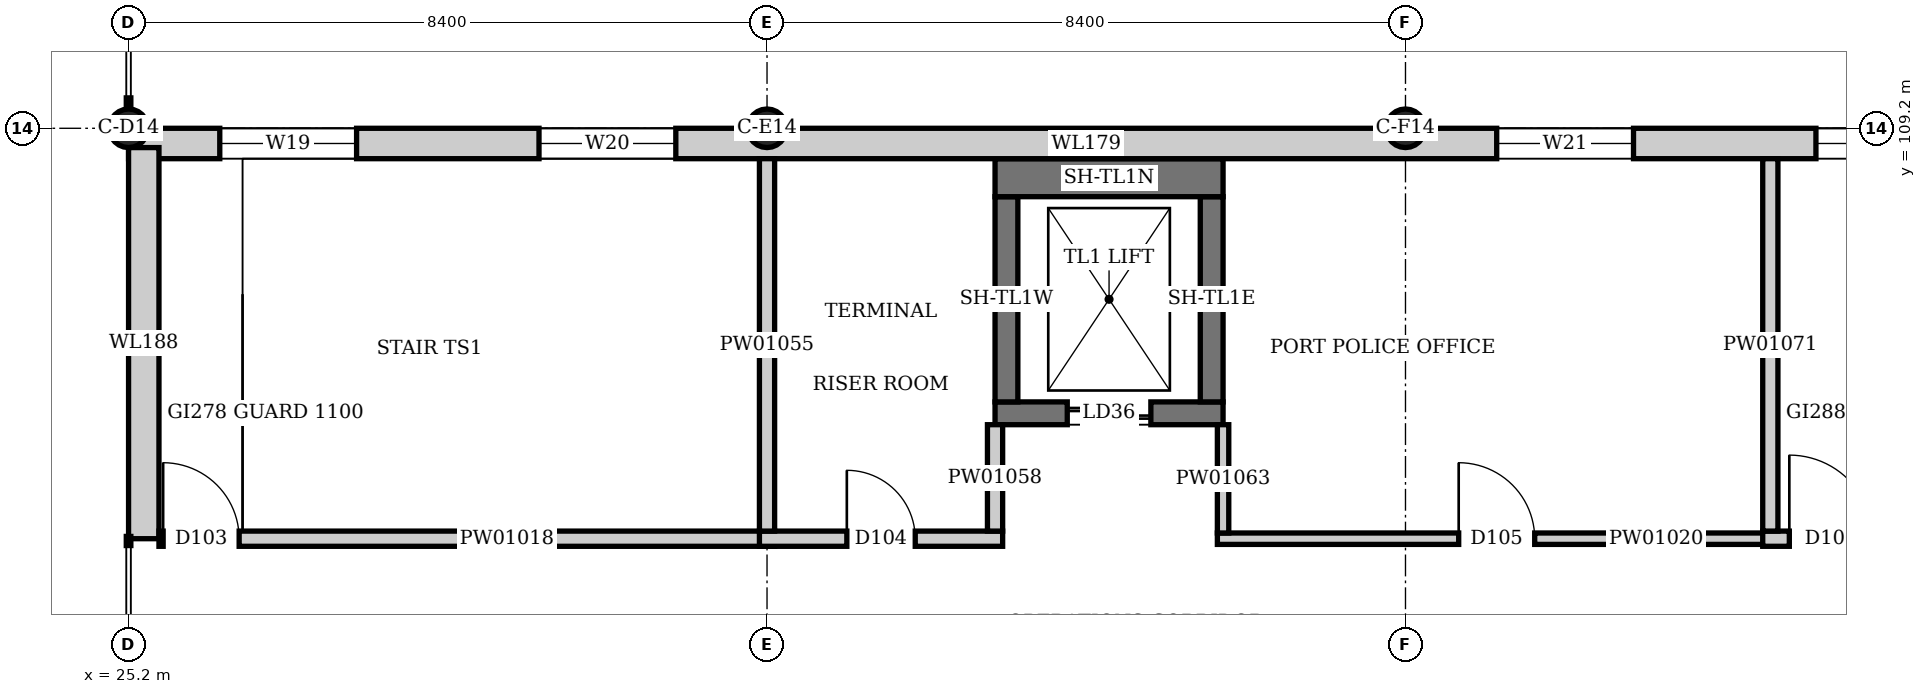
"""IFC4 building model, lengths in metres.
Left out: names, types, materials, properties, quantities, classifications, styles, units other than length and angle.
Written with IfcOpenShell. Run it as: python <this file> out.ifc"""

import sys

from ifc_helpers import new_model, si_unit, direction, frame, frame_2d, origin, origin_2d, place, context, subcontext, project, spatial, rectangle, hollow_circle, extrude, element, fill, save


model = new_model("IFC4")
c1 = context("Model", 3, precision=1e-05, world=origin(), true_north=direction((0.0, 1.0)))
c2 = subcontext(c1, "Body", "Model", "MODEL_VIEW")
j1 = project(units=[si_unit("LENGTHUNIT", "METRE"), si_unit("PLANEANGLEUNIT", "RADIAN")], contexts=[c1])
p1 = place(None, origin())
s1 = spatial("IfcSite", under=j1, at=p1, CompositionType="ELEMENT")
p2 = place(p1, origin())
s2 = spatial("IfcBuilding", under=s1, at=p2, CompositionType="ELEMENT")
p3 = place(p2, frame((0.0, 0.0, 6.0)))
s3 = spatial("IfcBuildingStorey", under=s2, at=p3, CompositionType="ELEMENT", Elevation=6.0)
for number, where, z_axis, x_axis in (
    (1, (25.2, 109.2, 0.0), (0.0, 0.0, 1.0), (1.0, 0.0, 0.0)),
    (2, (33.6, 109.2, 0.0), (0.0, 0.0, 1.0), (1.0, 0.0, 0.0)),
    (3, (42.0, 109.2, 0.0), (0.0, 0.0, 1.0), (1.0, 0.0, 0.0)),
):
    element("IfcColumn", number, at=place(p3, frame(where, z_axis=z_axis, x_axis=x_axis)), inside=s3, PredefinedType="COLUMN", context=c2, shape_type="SweptSolid", body=[
        extrude(hollow_circle(Radius=0.254, WallThickness=0.016, at=origin_2d()), origin(), (0.0, 0.0, 1.0), 4.8),
    ])
p4 = place(p3, frame((36.6, 105.45, 0.0), z_axis=(0.0, 0.0, 1.0), x_axis=(1.0, 0.0, 0.0)))
e4 = element("IfcWall", 4, at=p4, inside=s3, PredefinedType="SHEAR", context=c2, shape_type="SweptSolid", body=[
    extrude(rectangle(XDim=3.0, YDim=0.3, at=frame_2d((1.5, 0.0))), origin(), (0.0, 0.0, 1.0), 4.65),
])
p5 = place(p4, frame((0.95, 0.0, 0.0)))
e5 = element("IfcOpeningElement", 5, at=p5, cuts=e4, PredefinedType="OPENING", context=c2, shape_type="SweptSolid", body=[
    extrude(rectangle(XDim=1.1, YDim=2.1, at=frame_2d((0.55, 1.05))), frame((0.0, 0.16, 0.0), z_axis=(0.0, -1.0, 0.0), x_axis=(1.0, 0.0, 0.0)), (0.0, 0.0, 1.0), 0.32),
])
for number, where, z_axis, x_axis in (
    (6, (39.45, 105.6, 0.0), (0.0, 0.0, 1.0), (0.0, 1.0, 0.0)),
    (7, (36.75, 105.6, 0.0), (0.0, 0.0, 1.0), (0.0, 1.0, 0.0)),
):
    element("IfcWall", number, at=place(p3, frame(where, z_axis=z_axis, x_axis=x_axis)), inside=s3, PredefinedType="SHEAR", context=c2, shape_type="SweptSolid", body=[
        extrude(rectangle(XDim=2.7, YDim=0.3, at=frame_2d((1.35, 0.0))), origin(), (0.0, 0.0, 1.0), 4.65),
    ])
p6 = place(p3, frame((36.6, 108.55, 0.0), z_axis=(0.0, 0.0, 1.0), x_axis=(1.0, 0.0, 0.0)))
e8 = element("IfcWall", 8, at=p6, inside=s3, PredefinedType="SHEAR", context=c2, shape_type="SweptSolid", body=[
    extrude(rectangle(XDim=3.0, YDim=0.5, at=frame_2d((1.5, 0.0))), origin(), (0.0, 0.0, 1.0), 4.65),
])
p7 = place(p3, frame((25.2, 109.0, 0.0), z_axis=(0.0, 0.0, 1.0), x_axis=(1.0, 0.0, 0.0)))
e9 = element("IfcWall", 9, at=p7, inside=s3, PredefinedType="SOLIDWALL", context=c2, shape_type="SweptSolid", body=[
    extrude(rectangle(XDim=67.2, YDim=0.4, at=frame_2d((33.6, 0.0))), origin(), (0.0, 0.0, 1.0), 4.6),
])
p8 = place(p7, frame((1.2, 0.0, 0.9)))
e10 = element("IfcOpeningElement", 10, at=p8, cuts=e9, PredefinedType="OPENING", context=c2, shape_type="SweptSolid", body=[
    extrude(rectangle(XDim=1.8, YDim=1.8, at=frame_2d((0.9, 0.9))), frame((0.0, 0.21, 0.0), z_axis=(0.0, -1.0, 0.0), x_axis=(1.0, 0.0, 0.0)), (0.0, 0.0, 1.0), 0.42),
])
p9 = place(p7, frame((5.4, 0.0, 0.9)))
e11 = element("IfcOpeningElement", 11, at=p9, cuts=e9, PredefinedType="OPENING", context=c2, shape_type="SweptSolid", body=[
    extrude(rectangle(XDim=1.8, YDim=1.8, at=frame_2d((0.9, 0.9))), frame((0.0, 0.21, 0.0), z_axis=(0.0, -1.0, 0.0), x_axis=(1.0, 0.0, 0.0)), (0.0, 0.0, 1.0), 0.42),
])
p10 = place(p7, frame((18.0, 0.0, 0.9)))
e12 = element("IfcOpeningElement", 12, at=p10, cuts=e9, PredefinedType="OPENING", context=c2, shape_type="SweptSolid", body=[
    extrude(rectangle(XDim=1.8, YDim=1.8, at=frame_2d((0.9, 0.9))), frame((0.0, 0.21, 0.0), z_axis=(0.0, -1.0, 0.0), x_axis=(1.0, 0.0, 0.0)), (0.0, 0.0, 1.0), 0.42),
])
p11 = place(p7, frame((22.2, 0.0, 0.9)))
e13 = element("IfcOpeningElement", 13, at=p11, cuts=e9, PredefinedType="OPENING", context=c2, shape_type="SweptSolid", body=[
    extrude(rectangle(XDim=1.8, YDim=1.8, at=frame_2d((0.9, 0.9))), frame((0.0, 0.21, 0.0), z_axis=(0.0, -1.0, 0.0), x_axis=(1.0, 0.0, 0.0)), (0.0, 0.0, 1.0), 0.42),
])
p12 = place(p7, frame((26.4, 0.0, 0.9)))
e14 = element("IfcOpeningElement", 14, at=p12, cuts=e9, PredefinedType="OPENING", context=c2, shape_type="SweptSolid", body=[
    extrude(rectangle(XDim=1.8, YDim=1.8, at=frame_2d((0.9, 0.9))), frame((0.0, 0.21, 0.0), z_axis=(0.0, -1.0, 0.0), x_axis=(1.0, 0.0, 0.0)), (0.0, 0.0, 1.0), 0.42),
])
p13 = place(p7, frame((30.6, 0.0, 0.9)))
e15 = element("IfcOpeningElement", 15, at=p13, cuts=e9, PredefinedType="OPENING", context=c2, shape_type="SweptSolid", body=[
    extrude(rectangle(XDim=1.8, YDim=1.8, at=frame_2d((0.9, 0.9))), frame((0.0, 0.21, 0.0), z_axis=(0.0, -1.0, 0.0), x_axis=(1.0, 0.0, 0.0)), (0.0, 0.0, 1.0), 0.42),
])
p14 = place(p7, frame((34.8, 0.0, 0.9)))
e16 = element("IfcOpeningElement", 16, at=p14, cuts=e9, PredefinedType="OPENING", context=c2, shape_type="SweptSolid", body=[
    extrude(rectangle(XDim=1.8, YDim=1.8, at=frame_2d((0.9, 0.9))), frame((0.0, 0.21, 0.0), z_axis=(0.0, -1.0, 0.0), x_axis=(1.0, 0.0, 0.0)), (0.0, 0.0, 1.0), 0.42),
])
p15 = place(p7, frame((43.2, 0.0, 0.9)))
e17 = element("IfcOpeningElement", 17, at=p15, cuts=e9, PredefinedType="OPENING", context=c2, shape_type="SweptSolid", body=[
    extrude(rectangle(XDim=1.8, YDim=1.8, at=frame_2d((0.9, 0.9))), frame((0.0, 0.21, 0.0), z_axis=(0.0, -1.0, 0.0), x_axis=(1.0, 0.0, 0.0)), (0.0, 0.0, 1.0), 0.42),
])
p16 = place(p7, frame((47.4, 0.0, 0.9)))
e18 = element("IfcOpeningElement", 18, at=p16, cuts=e9, PredefinedType="OPENING", context=c2, shape_type="SweptSolid", body=[
    extrude(rectangle(XDim=1.8, YDim=1.8, at=frame_2d((0.9, 0.9))), frame((0.0, 0.21, 0.0), z_axis=(0.0, -1.0, 0.0), x_axis=(1.0, 0.0, 0.0)), (0.0, 0.0, 1.0), 0.42),
])
p17 = place(p7, frame((55.8, 0.0, 0.9)))
e19 = element("IfcOpeningElement", 19, at=p17, cuts=e9, PredefinedType="OPENING", context=c2, shape_type="SweptSolid", body=[
    extrude(rectangle(XDim=1.8, YDim=1.8, at=frame_2d((0.9, 0.9))), frame((0.0, 0.21, 0.0), z_axis=(0.0, -1.0, 0.0), x_axis=(1.0, 0.0, 0.0)), (0.0, 0.0, 1.0), 0.42),
])
p18 = place(p7, frame((64.2, 0.0, 0.9)))
e20 = element("IfcOpeningElement", 20, at=p18, cuts=e9, PredefinedType="OPENING", context=c2, shape_type="SweptSolid", body=[
    extrude(rectangle(XDim=1.8, YDim=1.8, at=frame_2d((0.9, 0.9))), frame((0.0, 0.21, 0.0), z_axis=(0.0, -1.0, 0.0), x_axis=(1.0, 0.0, 0.0)), (0.0, 0.0, 1.0), 0.42),
])
p19 = place(p3, frame((25.4, 103.8, 0.0), z_axis=(0.0, 0.0, 1.0), x_axis=(0.0, 1.0, 0.0)))
e21 = element("IfcWall", 21, at=p19, inside=s3, PredefinedType="SOLIDWALL", context=c2, shape_type="SweptSolid", body=[
    extrude(rectangle(XDim=5.146, YDim=0.4, at=frame_2d((2.573, 0.0))), origin(), (0.0, 0.0, 1.0), 4.6),
])
p20 = place(p3, frame((25.6, 103.8, 0.0), z_axis=(0.0, 0.0, 1.0), x_axis=(1.0, 0.0, 0.0)))
e22 = element("IfcWall", 22, at=p20, inside=s3, PredefinedType="PARTITIONING", context=c2, shape_type="SweptSolid", body=[
    extrude(rectangle(XDim=8.1, YDim=0.2, at=frame_2d((4.05, 0.0))), origin(), (0.0, 0.0, 1.0), 4.6),
])
p21 = place(p20, frame((0.055, 0.0, 0.0)))
e23 = element("IfcOpeningElement", 23, at=p21, cuts=e22, PredefinedType="OPENING", context=c2, shape_type="SweptSolid", body=[
    extrude(rectangle(XDim=1.0, YDim=2.4, at=frame_2d((0.5, 1.2))), frame((0.0, 0.11, 0.0), z_axis=(0.0, -1.0, 0.0), x_axis=(1.0, 0.0, 0.0)), (0.0, 0.0, 1.0), 0.22),
])
p22 = place(p3, frame((33.5, 103.8, 0.0), z_axis=(0.0, 0.0, 1.0), x_axis=(1.0, 0.0, 0.0)))
e24 = element("IfcWall", 24, at=p22, inside=s3, PredefinedType="PARTITIONING", context=c2, shape_type="SweptSolid", body=[
    extrude(rectangle(XDim=3.2, YDim=0.2, at=frame_2d((1.6, 0.0))), origin(), (0.0, 0.0, 1.0), 4.6),
])
p23 = place(p22, frame((1.15, 0.0, 0.0)))
e25 = element("IfcOpeningElement", 25, at=p23, cuts=e24, PredefinedType="OPENING", context=c2, shape_type="SweptSolid", body=[
    extrude(rectangle(XDim=0.9, YDim=2.1, at=frame_2d((0.45, 1.05))), frame((0.0, 0.11, 0.0), z_axis=(0.0, -1.0, 0.0), x_axis=(1.0, 0.0, 0.0)), (0.0, 0.0, 1.0), 0.22),
])
p24 = place(p3, frame((39.525, 103.8, 0.0), z_axis=(0.0, 0.0, 1.0), x_axis=(1.0, 0.0, 0.0)))
e26 = element("IfcWall", 26, at=p24, inside=s3, PredefinedType="PARTITIONING", context=c2, shape_type="SweptSolid", body=[
    extrude(rectangle(XDim=7.375, YDim=0.15, at=frame_2d((3.688, 0.0))), origin(), (0.0, 0.0, 1.0), 4.6),
])
p25 = place(p24, frame((3.175, 0.0, 0.0)))
e27 = element("IfcOpeningElement", 27, at=p25, cuts=e26, PredefinedType="OPENING", context=c2, shape_type="SweptSolid", body=[
    extrude(rectangle(XDim=1.0, YDim=2.1, at=frame_2d((0.5, 1.05))), frame((0.0, 0.085, 0.0), z_axis=(0.0, -1.0, 0.0), x_axis=(1.0, 0.0, 0.0)), (0.0, 0.0, 1.0), 0.17),
])
p26 = place(p3, frame((46.7, 103.8, 0.0), z_axis=(0.0, 0.0, 1.0), x_axis=(1.0, 0.0, 0.0)))
e28 = element("IfcWall", 28, at=p26, inside=s3, PredefinedType="PARTITIONING", context=c2, shape_type="SweptSolid", body=[
    extrude(rectangle(XDim=15.8, YDim=0.2, at=frame_2d((7.9, 0.0))), origin(), (0.0, 0.0, 1.0), 4.6),
])
p27 = place(p26, frame((0.35, 0.0, 0.0)))
e29 = element("IfcOpeningElement", 29, at=p27, cuts=e28, PredefinedType="OPENING", context=c2, shape_type="SweptSolid", body=[
    extrude(rectangle(XDim=1.1, YDim=2.4, at=frame_2d((0.55, 1.2))), frame((0.0, 0.11, 0.0), z_axis=(0.0, -1.0, 0.0), x_axis=(1.0, 0.0, 0.0)), (0.0, 0.0, 1.0), 0.22),
])
p28 = place(p26, frame((8.15, 0.0, 0.0)))
e30 = element("IfcOpeningElement", 30, at=p28, cuts=e28, PredefinedType="OPENING", context=c2, shape_type="SweptSolid", body=[
    extrude(rectangle(XDim=1.1, YDim=2.4, at=frame_2d((0.55, 1.2))), frame((0.0, 0.11, 0.0), z_axis=(0.0, -1.0, 0.0), x_axis=(1.0, 0.0, 0.0)), (0.0, 0.0, 1.0), 0.22),
])
p29 = place(p3, frame((33.6, 103.9, 0.0), z_axis=(0.0, 0.0, 1.0), x_axis=(0.0, 1.0, 0.0)))
e31 = element("IfcWall", 31, at=p29, inside=s3, PredefinedType="PARTITIONING", context=c2, shape_type="SweptSolid", body=[
    extrude(rectangle(XDim=4.9, YDim=0.2, at=frame_2d((2.45, 0.0))), origin(), (0.0, 0.0, 1.0), 4.146),
])
p30 = place(p3, frame((36.6, 103.9, 0.0), z_axis=(0.0, 0.0, 1.0), x_axis=(0.0, 1.0, 0.0)))
e32 = element("IfcWall", 32, at=p30, inside=s3, PredefinedType="PARTITIONING", context=c2, shape_type="SweptSolid", body=[
    extrude(rectangle(XDim=1.4, YDim=0.2, at=frame_2d((0.7, 0.0))), origin(), (0.0, 0.0, 1.0), 4.6),
])
p31 = place(p3, frame((39.6, 103.875, 0.0), z_axis=(0.0, 0.0, 1.0), x_axis=(0.0, 1.0, 0.0)))
e33 = element("IfcWall", 33, at=p31, inside=s3, PredefinedType="PARTITIONING", context=c2, shape_type="SweptSolid", body=[
    extrude(rectangle(XDim=1.425, YDim=0.15, at=frame_2d((0.712, 0.0))), origin(), (0.0, 0.0, 1.0), 4.6),
])
p32 = place(p3, frame((46.8, 103.9, 0.0), z_axis=(0.0, 0.0, 1.0), x_axis=(0.0, 1.0, 0.0)))
e34 = element("IfcWall", 34, at=p32, inside=s3, PredefinedType="PARTITIONING", context=c2, shape_type="SweptSolid", body=[
    extrude(rectangle(XDim=4.9, YDim=0.2, at=frame_2d((2.45, 0.0))), origin(), (0.0, 0.0, 1.0), 4.6),
])
p33 = place(p8, origin())
e35 = element("IfcWindow", 35, at=p33, inside=s3, PartitioningType="SINGLE_PANEL", PredefinedType="WINDOW", context=c2, shape_type="SweptSolid", body=[
    extrude(rectangle(XDim=1.8, YDim=1.8, at=frame_2d((0.9, 0.9))), frame((0.0, 0.03, 0.0), z_axis=(0.0, -1.0, 0.0), x_axis=(1.0, 0.0, 0.0)), (0.0, 0.0, 1.0), 0.06),
])
fill(e10, e35)
p34 = place(p9, origin())
e36 = element("IfcWindow", 36, at=p34, inside=s3, PartitioningType="SINGLE_PANEL", PredefinedType="WINDOW", context=c2, shape_type="SweptSolid", body=[
    extrude(rectangle(XDim=1.8, YDim=1.8, at=frame_2d((0.9, 0.9))), frame((0.0, 0.03, 0.0), z_axis=(0.0, -1.0, 0.0), x_axis=(1.0, 0.0, 0.0)), (0.0, 0.0, 1.0), 0.06),
])
fill(e11, e36)
p35 = place(p10, origin())
e37 = element("IfcWindow", 37, at=p35, inside=s3, PartitioningType="SINGLE_PANEL", PredefinedType="WINDOW", context=c2, shape_type="SweptSolid", body=[
    extrude(rectangle(XDim=1.8, YDim=1.8, at=frame_2d((0.9, 0.9))), frame((0.0, 0.03, 0.0), z_axis=(0.0, -1.0, 0.0), x_axis=(1.0, 0.0, 0.0)), (0.0, 0.0, 1.0), 0.06),
])
fill(e12, e37)
p36 = place(p11, origin())
e38 = element("IfcWindow", 38, at=p36, inside=s3, PartitioningType="SINGLE_PANEL", PredefinedType="WINDOW", context=c2, shape_type="SweptSolid", body=[
    extrude(rectangle(XDim=1.8, YDim=1.8, at=frame_2d((0.9, 0.9))), frame((0.0, 0.03, 0.0), z_axis=(0.0, -1.0, 0.0), x_axis=(1.0, 0.0, 0.0)), (0.0, 0.0, 1.0), 0.06),
])
fill(e13, e38)
p37 = place(p21, origin())
e39 = element("IfcDoor", 39, at=p37, inside=s3, OperationType="SINGLE_SWING_LEFT", PredefinedType="DOOR", context=c2, shape_type="SweptSolid", body=[
    extrude(rectangle(XDim=1.0, YDim=2.4, at=frame_2d((0.5, 1.2))), frame((0.0, 0.025, 0.0), z_axis=(0.0, -1.0, 0.0), x_axis=(1.0, 0.0, 0.0)), (0.0, 0.0, 1.0), 0.05),
])
fill(e23, e39)
p38 = place(p23, origin())
e40 = element("IfcDoor", 40, at=p38, inside=s3, OperationType="SINGLE_SWING_LEFT", PredefinedType="DOOR", context=c2, shape_type="SweptSolid", body=[
    extrude(rectangle(XDim=0.9, YDim=2.1, at=frame_2d((0.45, 1.05))), frame((0.0, 0.025, 0.0), z_axis=(0.0, -1.0, 0.0), x_axis=(1.0, 0.0, 0.0)), (0.0, 0.0, 1.0), 0.05),
])
fill(e25, e40)
p39 = place(p25, origin())
e41 = element("IfcDoor", 41, at=p39, inside=s3, OperationType="SINGLE_SWING_LEFT", PredefinedType="DOOR", context=c2, shape_type="SweptSolid", body=[
    extrude(rectangle(XDim=1.0, YDim=2.1, at=frame_2d((0.5, 1.05))), frame((0.0, 0.025, 0.0), z_axis=(0.0, -1.0, 0.0), x_axis=(1.0, 0.0, 0.0)), (0.0, 0.0, 1.0), 0.05),
])
fill(e27, e41)
p40 = place(p27, origin())
e42 = element("IfcDoor", 42, at=p40, inside=s3, OperationType="SINGLE_SWING_LEFT", PredefinedType="DOOR", context=c2, shape_type="SweptSolid", body=[
    extrude(rectangle(XDim=1.1, YDim=2.4, at=frame_2d((0.55, 1.2))), frame((0.0, 0.025, 0.0), z_axis=(0.0, -1.0, 0.0), x_axis=(1.0, 0.0, 0.0)), (0.0, 0.0, 1.0), 0.05),
])
fill(e29, e42)
p41 = place(p5, origin())
e43 = element("IfcDoor", 43, at=p41, inside=s3, OperationType="SLIDING_TO_LEFT", PredefinedType="DOOR", context=c2, shape_type="SweptSolid", body=[
    extrude(rectangle(XDim=1.1, YDim=2.1, at=frame_2d((0.55, 1.05))), frame((0.0, 0.025, 0.0), z_axis=(0.0, -1.0, 0.0), x_axis=(1.0, 0.0, 0.0)), (0.0, 0.0, 1.0), 0.05),
])
fill(e5, e43)
save(model, sys.argv[1])
